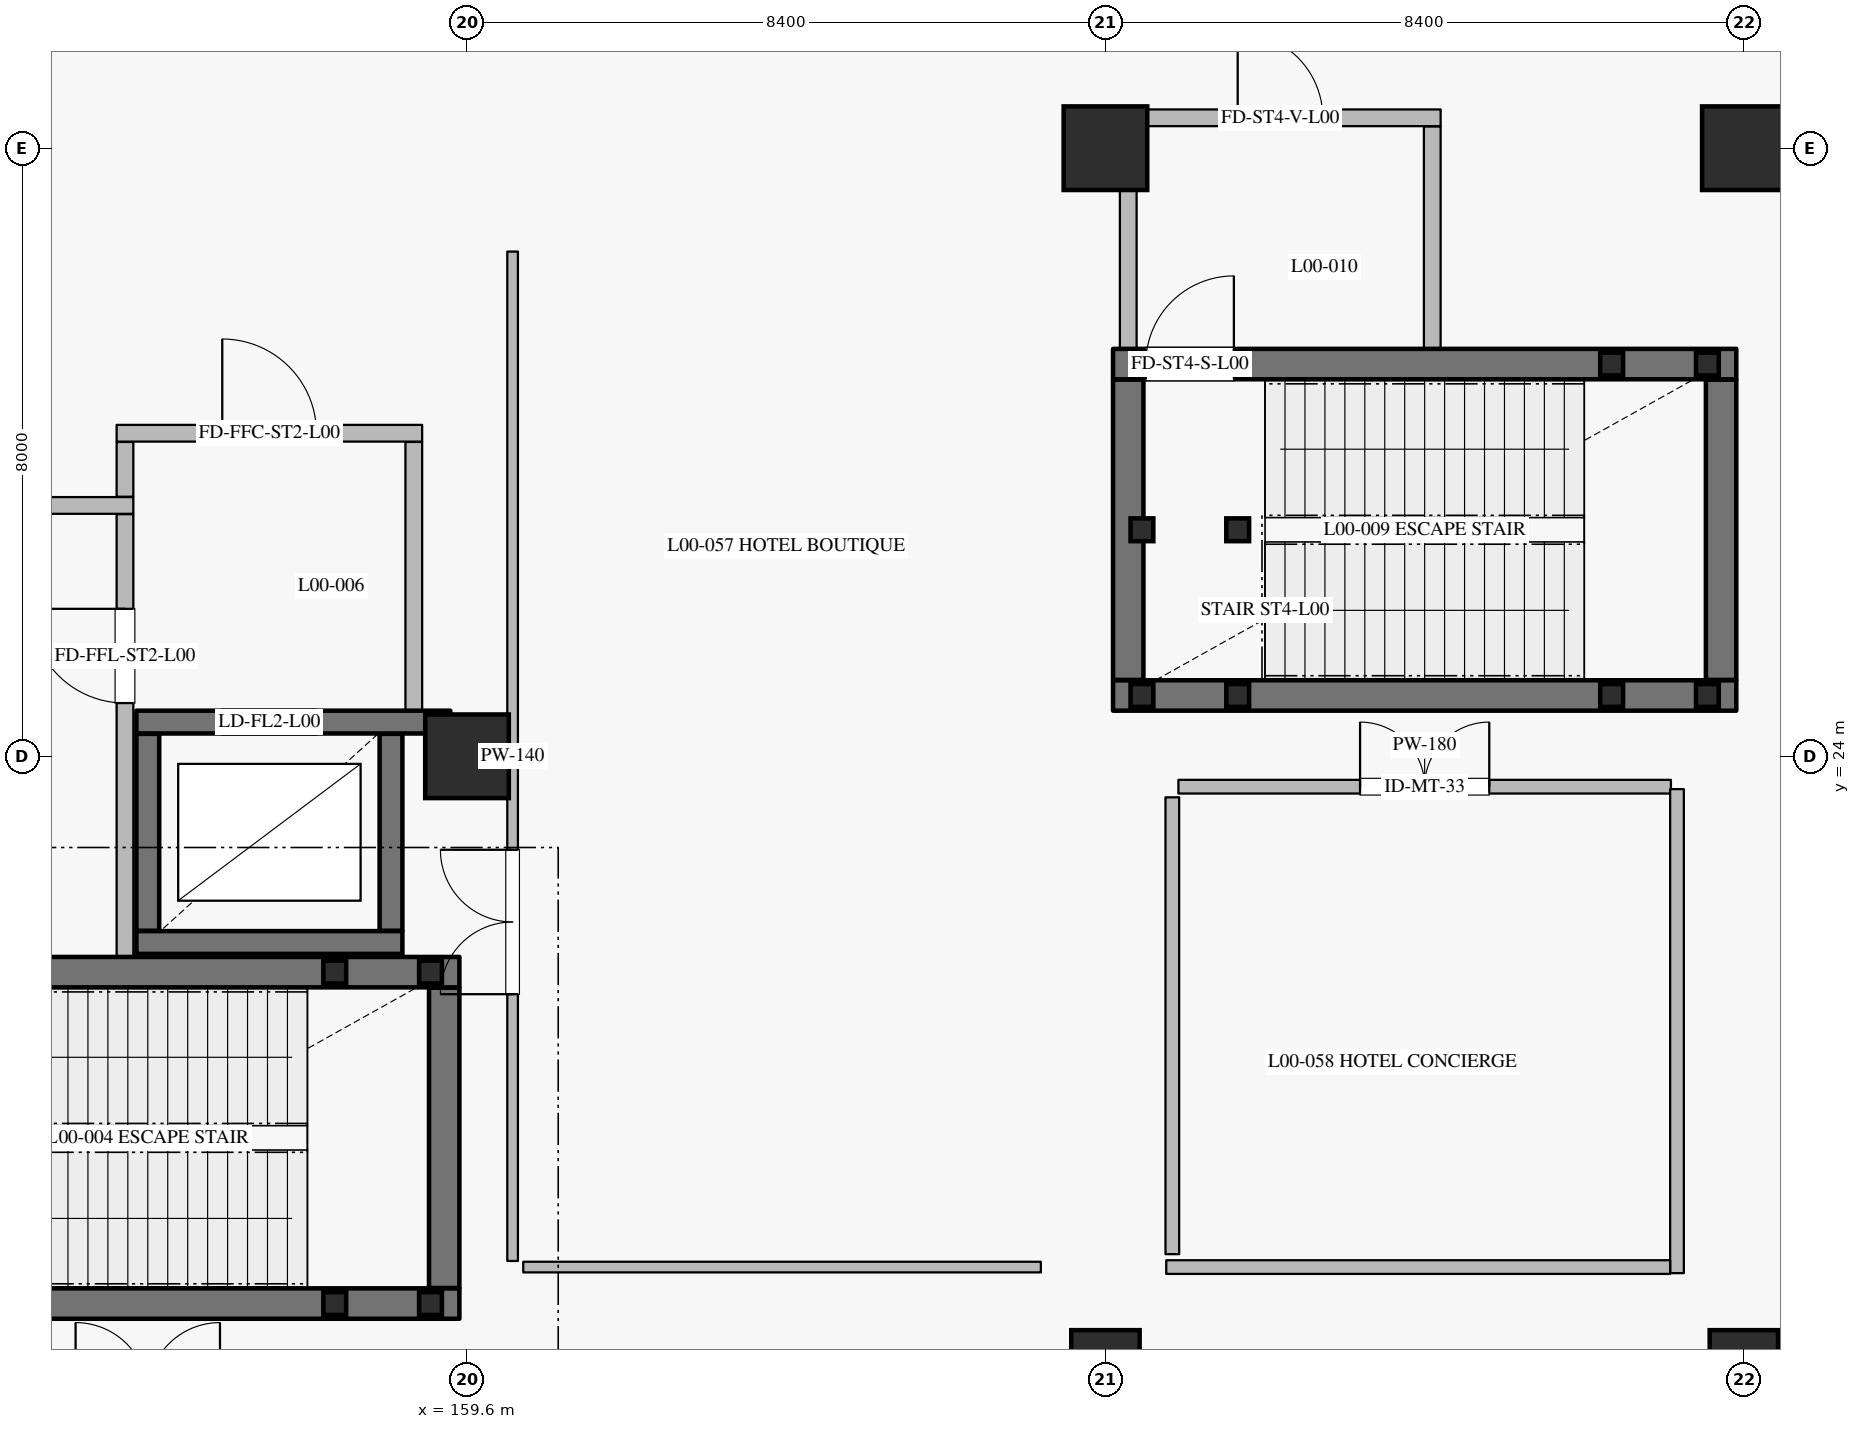
"""IFC4 building model, lengths in metres.
Left out: names, types, materials, properties, quantities, classifications, styles, units other than length and angle.
Written with IfcOpenShell. Run it as: python <this file> out.ifc"""

import sys

from ifc_helpers import new_model, si_unit, direction, frame, frame_2d, origin, origin_2d, place, context, subcontext, project, spatial, rectangle, hollow_rectangle, circle, extrude, element, fill, save


model = new_model("IFC4")
c1 = context("Model", 3, precision=1e-05, world=origin(), true_north=direction((0.0, 1.0)))
c2 = subcontext(c1, "Body", "Model", "MODEL_VIEW")
j1 = project(units=[si_unit("LENGTHUNIT", "METRE"), si_unit("PLANEANGLEUNIT", "RADIAN")], contexts=[c1])
p1 = place(None, origin())
s1 = spatial("IfcSite", under=j1, at=p1, CompositionType="ELEMENT")
p2 = place(p1, origin())
s2 = spatial("IfcBuilding", under=s1, at=p2, CompositionType="ELEMENT")
p3 = place(p2, origin())
s3 = spatial("IfcBuildingStorey", under=s2, at=p3, CompositionType="ELEMENT", Elevation=0.0)
p4 = place(p3, frame((159.6, 24.0, 0.0), z_axis=(0.0, 0.0, 1.0), x_axis=(1.0, 0.0, 0.0)))
e1 = element("IfcColumn", 1, at=p4, inside=s3, PredefinedType="COLUMN", context=c2, shape_type="SweptSolid", body=[
    extrude(circle(Radius=0.55, at=origin_2d()), origin(), (0.0, 0.0, 1.0), 6.0),
])
p5 = place(p3, frame((168.0, 16.0, 0.0), z_axis=(0.0, 0.0, 1.0), x_axis=(1.0, 0.0, 0.0)))
e2 = element("IfcColumn", 2, at=p5, inside=s3, PredefinedType="COLUMN", context=c2, shape_type="SweptSolid", body=[
    extrude(circle(Radius=0.45, at=origin_2d()), origin(), (0.0, 0.0, 1.0), 6.0),
])
p6 = place(p3, frame((168.0, 32.0, 0.0), z_axis=(0.0, 0.0, 1.0), x_axis=(1.0, 0.0, 0.0)))
e3 = element("IfcColumn", 3, at=p6, inside=s3, PredefinedType="COLUMN", context=c2, shape_type="SweptSolid", body=[
    extrude(circle(Radius=0.55, at=origin_2d()), origin(), (0.0, 0.0, 1.0), 6.0),
])
p7 = place(p3, frame((176.4, 16.0, 0.0), z_axis=(0.0, 0.0, 1.0), x_axis=(1.0, 0.0, 0.0)))
e4 = element("IfcColumn", 4, at=p7, inside=s3, PredefinedType="COLUMN", context=c2, shape_type="SweptSolid", body=[
    extrude(circle(Radius=0.45, at=origin_2d()), origin(), (0.0, 0.0, 1.0), 6.0),
])
p8 = place(p3, frame((176.4, 32.0, 0.0), z_axis=(0.0, 0.0, 1.0), x_axis=(1.0, 0.0, 0.0)))
e5 = element("IfcColumn", 5, at=p8, inside=s3, PredefinedType="COLUMN", context=c2, shape_type="SweptSolid", body=[
    extrude(circle(Radius=0.55, at=origin_2d()), origin(), (0.0, 0.0, 1.0), 6.0),
])
p9 = place(p3, frame((155.25, 21.55, 0.0), z_axis=(0.0, 0.0, 1.0), x_axis=(1.0, 0.0, 0.0)))
e6 = element("IfcWall", 6, at=p9, inside=s3, PredefinedType="SHEAR", context=c2, shape_type="SweptSolid", body=[
    extrude(rectangle(XDim=3.5, YDim=0.3, at=frame_2d((1.75, 0.0))), origin(), (0.0, 0.0, 1.0), 5.675),
])
p10 = place(p3, frame((158.6, 21.705, 0.0), z_axis=(0.0, 0.0, 1.0), x_axis=(0.0, 1.0, 0.0)))
e7 = element("IfcWall", 7, at=p10, inside=s3, PredefinedType="SHEAR", context=c2, shape_type="SweptSolid", body=[
    extrude(rectangle(XDim=2.59, YDim=0.3, at=frame_2d((1.295, 0.0))), origin(), (0.0, 0.0, 1.0), 5.675),
])
p11 = place(p3, frame((159.38, 24.45, 0.0), z_axis=(0.0, 0.0, 1.0), x_axis=(-1.0, 0.0, 0.0)))
e8 = element("IfcWall", 8, at=p11, inside=s3, PredefinedType="SHEAR", context=c2, shape_type="SweptSolid", body=[
    extrude(rectangle(XDim=4.13, YDim=0.3, at=frame_2d((2.065, 0.0))), origin(), (0.0, 0.0, 1.0), 5.675),
])
p12 = place(p11, frame((1.755, 0.0, 0.0)))
e9 = element("IfcOpeningElement", 9, at=p12, cuts=e8, PredefinedType="OPENING", context=c2, shape_type="SweptSolid", body=[
    extrude(rectangle(XDim=1.25, YDim=2.25, at=frame_2d((0.625, 1.125))), frame((0.0, 0.16, 0.0), z_axis=(0.0, -1.0, 0.0), x_axis=(1.0, 0.0, 0.0)), (0.0, 0.0, 1.0), 0.32),
])
p13 = place(p3, frame((155.4, 24.295, 0.0), z_axis=(0.0, 0.0, 1.0), x_axis=(0.0, -1.0, 0.0)))
e10 = element("IfcWall", 10, at=p13, inside=s3, PredefinedType="SHEAR", context=c2, shape_type="SweptSolid", body=[
    extrude(rectangle(XDim=2.59, YDim=0.3, at=frame_2d((1.295, 0.0))), origin(), (0.0, 0.0, 1.0), 5.675),
])
p14 = place(p3, frame((151.3, 16.8, 0.0), z_axis=(0.0, 0.0, 1.0), x_axis=(1.0, 0.0, 0.0)))
e11 = element("IfcWall", 11, at=p14, inside=s3, PredefinedType="SHEAR", context=c2, shape_type="SweptSolid", body=[
    extrude(rectangle(XDim=8.2, YDim=0.4, at=frame_2d((4.1, 0.0))), origin(), (0.0, 0.0, 1.0), 5.675),
])
p15 = place(p3, frame((159.3, 17.005, 0.0), z_axis=(0.0, 0.0, 1.0), x_axis=(0.0, 1.0, 0.0)))
e12 = element("IfcWall", 12, at=p15, inside=s3, PredefinedType="SHEAR", context=c2, shape_type="SweptSolid", body=[
    extrude(rectangle(XDim=3.95, YDim=0.4, at=frame_2d((1.975, 0.0))), origin(), (0.0, 0.0, 1.0), 5.675),
])
p16 = place(p3, frame((151.3, 21.16, 0.0), z_axis=(0.0, 0.0, 1.0), x_axis=(1.0, 0.0, 0.0)))
e13 = element("IfcWall", 13, at=p16, inside=s3, PredefinedType="SHEAR", context=c2, shape_type="SweptSolid", body=[
    extrude(rectangle(XDim=8.2, YDim=0.4, at=frame_2d((4.1, 0.0))), origin(), (0.0, 0.0, 1.0), 5.675),
])
p17 = place(p16, frame((0.43, 0.0, 0.0)))
e14 = element("IfcOpeningElement", 14, at=p17, cuts=e13, PredefinedType="OPENING", context=c2, shape_type="SweptSolid", body=[
    extrude(rectangle(XDim=1.16, YDim=2.2, at=frame_2d((0.58, 1.1))), frame((0.0, 0.21, 0.0), z_axis=(0.0, -1.0, 0.0), x_axis=(1.0, 0.0, 0.0)), (0.0, 0.0, 1.0), 0.42),
])
p18 = place(p3, frame((151.39, 27.3, 0.0), z_axis=(0.0, 0.0, 1.0), x_axis=(1.0, 0.0, 0.0)))
e15 = element("IfcWall", 15, at=p18, inside=s3, PredefinedType="PARTITIONING", context=c2, shape_type="SweptSolid", body=[
    extrude(rectangle(XDim=3.82, YDim=0.22, at=frame_2d((1.91, 0.0))), origin(), (0.0, 0.0, 1.0), 5.675),
])
p19 = place(p18, frame((1.35, 0.0, 0.0)))
e16 = element("IfcOpeningElement", 16, at=p19, cuts=e15, PredefinedType="OPENING", context=c2, shape_type="SweptSolid", body=[
    extrude(rectangle(XDim=1.12, YDim=2.2, at=frame_2d((0.56, 1.1))), frame((0.0, 0.12, 0.0), z_axis=(0.0, -1.0, 0.0), x_axis=(1.0, 0.0, 0.0)), (0.0, 0.0, 1.0), 0.24),
])
p20 = place(p3, frame((155.1, 21.365, 0.0), z_axis=(0.0, 0.0, 1.0), x_axis=(0.0, 1.0, 0.0)))
e17 = element("IfcWall", 17, at=p20, inside=s3, PredefinedType="PARTITIONING", context=c2, shape_type="SweptSolid", body=[
    extrude(rectangle(XDim=5.82, YDim=0.22, at=frame_2d((2.91, 0.0))), origin(), (0.0, 0.0, 1.0), 5.675),
])
p21 = place(p20, frame((3.335, 0.0, 0.0)))
e18 = element("IfcOpeningElement", 18, at=p21, cuts=e17, PredefinedType="OPENING", context=c2, shape_type="SweptSolid", body=[
    extrude(rectangle(XDim=1.24, YDim=2.2, at=frame_2d((0.62, 1.1))), frame((0.0, 0.12, 0.0), z_axis=(0.0, -1.0, 0.0), x_axis=(1.0, 0.0, 0.0)), (0.0, 0.0, 1.0), 0.24),
])
p22 = place(p3, frame((155.1, 27.415, 0.0), z_axis=(0.0, 0.0, 1.0), x_axis=(0.0, 1.0, 0.0)))
e19 = element("IfcWall", 19, at=p22, inside=s3, PredefinedType="PARTITIONING", context=c2, shape_type="SweptSolid", body=[
    extrude(rectangle(XDim=0.72, YDim=0.22, at=frame_2d((0.36, 0.0))), origin(), (0.0, 0.0, 1.0), 5.675),
])
p23 = place(p3, frame((158.9, 24.605, 0.0), z_axis=(0.0, 0.0, 1.0), x_axis=(0.0, 1.0, 0.0)))
e20 = element("IfcWall", 20, at=p23, inside=s3, PredefinedType="PARTITIONING", context=c2, shape_type="SweptSolid", body=[
    extrude(rectangle(XDim=3.53, YDim=0.22, at=frame_2d((1.765, 0.0))), origin(), (0.0, 0.0, 1.0), 5.675),
])
p24 = place(p3, frame((154.99, 28.25, 0.0), z_axis=(0.0, 0.0, 1.0), x_axis=(1.0, 0.0, 0.0)))
e21 = element("IfcWall", 21, at=p24, inside=s3, PredefinedType="PARTITIONING", context=c2, shape_type="SweptSolid", body=[
    extrude(rectangle(XDim=4.02, YDim=0.22, at=frame_2d((2.01, 0.0))), origin(), (0.0, 0.0, 1.0), 5.675),
])
p25 = place(p24, frame((1.39, 0.0, 0.0)))
e22 = element("IfcOpeningElement", 22, at=p25, cuts=e21, PredefinedType="OPENING", context=c2, shape_type="SweptSolid", body=[
    extrude(rectangle(XDim=1.24, YDim=2.2, at=frame_2d((0.62, 1.1))), frame((0.0, 0.12, 0.0), z_axis=(0.0, -1.0, 0.0), x_axis=(1.0, 0.0, 0.0)), (0.0, 0.0, 1.0), 0.24),
])
for number, where, z_axis, x_axis in (
    (23, (157.86, 16.8, -2.7), (0.0, 0.0, 1.0), (1.0, 0.0, 0.0)),
    (24, (157.86, 21.16, -2.7), (0.0, 0.0, 1.0), (1.0, 0.0, 0.0)),
    (25, (159.12, 16.8, -2.7), (0.0, 0.0, 1.0), (1.0, 0.0, 0.0)),
    (26, (159.12, 21.16, -2.7), (0.0, 0.0, 1.0), (1.0, 0.0, 0.0)),
):
    element("IfcColumn", number, at=place(p3, frame(where, z_axis=z_axis, x_axis=x_axis)), inside=s3, PredefinedType="COLUMN", context=c2, shape_type="SweptSolid", body=[
        extrude(hollow_rectangle(XDim=0.3, YDim=0.3, WallThickness=0.012, at=origin_2d()), origin(), (0.0, 0.0, 1.0), 5.52),
    ])
p26 = place(p3, frame((168.1, 24.8, 0.0), z_axis=(0.0, 0.0, 1.0), x_axis=(1.0, 0.0, 0.0)))
e27 = element("IfcWall", 27, at=p26, inside=s3, PredefinedType="SHEAR", context=c2, shape_type="SweptSolid", body=[
    extrude(rectangle(XDim=8.2, YDim=0.4, at=frame_2d((4.1, 0.0))), origin(), (0.0, 0.0, 1.0), 5.675),
])
p27 = place(p3, frame((176.1, 25.005, 0.0), z_axis=(0.0, 0.0, 1.0), x_axis=(0.0, 1.0, 0.0)))
e28 = element("IfcWall", 28, at=p27, inside=s3, PredefinedType="SHEAR", context=c2, shape_type="SweptSolid", body=[
    extrude(rectangle(XDim=3.95, YDim=0.4, at=frame_2d((1.975, 0.0))), origin(), (0.0, 0.0, 1.0), 5.675),
])
p28 = place(p3, frame((168.1, 29.16, 0.0), z_axis=(0.0, 0.0, 1.0), x_axis=(1.0, 0.0, 0.0)))
e29 = element("IfcWall", 29, at=p28, inside=s3, PredefinedType="SHEAR", context=c2, shape_type="SweptSolid", body=[
    extrude(rectangle(XDim=8.2, YDim=0.4, at=frame_2d((4.1, 0.0))), origin(), (0.0, 0.0, 1.0), 5.675),
])
p29 = place(p28, frame((0.43, 0.0, 0.0)))
e30 = element("IfcOpeningElement", 30, at=p29, cuts=e29, PredefinedType="OPENING", context=c2, shape_type="SweptSolid", body=[
    extrude(rectangle(XDim=1.16, YDim=2.2, at=frame_2d((0.58, 1.1))), frame((0.0, 0.21, 0.0), z_axis=(0.0, -1.0, 0.0), x_axis=(1.0, 0.0, 0.0)), (0.0, 0.0, 1.0), 0.42),
])
p30 = place(p3, frame((168.3, 25.005, 0.0), z_axis=(0.0, 0.0, 1.0), x_axis=(0.0, 1.0, 0.0)))
e31 = element("IfcWall", 31, at=p30, inside=s3, PredefinedType="SHEAR", context=c2, shape_type="SweptSolid", body=[
    extrude(rectangle(XDim=3.95, YDim=0.4, at=frame_2d((1.975, 0.0))), origin(), (0.0, 0.0, 1.0), 5.675),
])
p31 = place(p3, frame((168.3, 29.365, 0.0), z_axis=(0.0, 0.0, 1.0), x_axis=(0.0, 1.0, 0.0)))
e32 = element("IfcWall", 32, at=p31, inside=s3, PredefinedType="PARTITIONING", context=c2, shape_type="SweptSolid", body=[
    extrude(rectangle(XDim=2.92, YDim=0.22, at=frame_2d((1.46, 0.0))), origin(), (0.0, 0.0, 1.0), 4.75),
])
p32 = place(p3, frame((168.19, 32.4, 0.0), z_axis=(0.0, 0.0, 1.0), x_axis=(1.0, 0.0, 0.0)))
e33 = element("IfcWall", 33, at=p32, inside=s3, PredefinedType="PARTITIONING", context=c2, shape_type="SweptSolid", body=[
    extrude(rectangle(XDim=4.22, YDim=0.22, at=frame_2d((2.11, 0.0))), origin(), (0.0, 0.0, 1.0), 5.675),
])
p33 = place(p32, frame((1.55, 0.0, 0.0)))
e34 = element("IfcOpeningElement", 34, at=p33, cuts=e33, PredefinedType="OPENING", context=c2, shape_type="SweptSolid", body=[
    extrude(rectangle(XDim=1.12, YDim=2.2, at=frame_2d((0.56, 1.1))), frame((0.0, 0.12, 0.0), z_axis=(0.0, -1.0, 0.0), x_axis=(1.0, 0.0, 0.0)), (0.0, 0.0, 1.0), 0.24),
])
p34 = place(p3, frame((172.3, 29.365, 0.0), z_axis=(0.0, 0.0, 1.0), x_axis=(0.0, 1.0, 0.0)))
e35 = element("IfcWall", 35, at=p34, inside=s3, PredefinedType="PARTITIONING", context=c2, shape_type="SweptSolid", body=[
    extrude(rectangle(XDim=2.92, YDim=0.22, at=frame_2d((1.46, 0.0))), origin(), (0.0, 0.0, 1.0), 5.675),
])
for number, where, z_axis, x_axis in (
    (36, (168.48, 24.8, 0.0), (0.0, 0.0, 1.0), (1.0, 0.0, 0.0)),
    (37, (168.48, 26.98, 0.0), (0.0, 0.0, 1.0), (1.0, 0.0, 0.0)),
    (38, (169.74, 24.8, 0.0), (0.0, 0.0, 1.0), (1.0, 0.0, 0.0)),
    (39, (169.74, 26.98, 0.0), (0.0, 0.0, 1.0), (1.0, 0.0, 0.0)),
):
    element("IfcColumn", number, at=place(p3, frame(where, z_axis=z_axis, x_axis=x_axis)), inside=s3, PredefinedType="COLUMN", context=c2, shape_type="SweptSolid", body=[
        extrude(hollow_rectangle(XDim=0.3, YDim=0.3, WallThickness=0.012, at=origin_2d()), origin(), (0.0, 0.0, 1.0), 5.82),
    ])
for number, where, z_axis, x_axis in (
    (40, (174.66, 24.8, -2.7), (0.0, 0.0, 1.0), (1.0, 0.0, 0.0)),
    (41, (174.66, 29.16, -2.7), (0.0, 0.0, 1.0), (1.0, 0.0, 0.0)),
    (42, (175.92, 24.8, -2.7), (0.0, 0.0, 1.0), (1.0, 0.0, 0.0)),
    (43, (175.92, 29.16, -2.7), (0.0, 0.0, 1.0), (1.0, 0.0, 0.0)),
):
    element("IfcColumn", number, at=place(p3, frame(where, z_axis=z_axis, x_axis=x_axis)), inside=s3, PredefinedType="COLUMN", context=c2, shape_type="SweptSolid", body=[
        extrude(hollow_rectangle(XDim=0.3, YDim=0.3, WallThickness=0.012, at=origin_2d()), origin(), (0.0, 0.0, 1.0), 5.52),
    ])
p35 = place(p3, frame((160.2, 17.36, 0.0), z_axis=(0.0, 0.0, 1.0), x_axis=(0.0, 1.0, 0.0)))
e44 = element("IfcWall", 44, at=p35, inside=s3, PredefinedType="PARTITIONING", context=c2, shape_type="SweptSolid", body=[
    extrude(rectangle(XDim=13.28, YDim=0.14, at=frame_2d((6.64, 0.0))), origin(), (0.0, 0.0, 1.0), 5.675),
])
p36 = place(p35, frame((3.51, 0.0, 0.0)))
e45 = element("IfcOpeningElement", 45, at=p36, cuts=e44, PredefinedType="OPENING", context=c2, shape_type="SweptSolid", body=[
    extrude(rectangle(XDim=1.9, YDim=2.4, at=frame_2d((0.95, 1.2))), frame((0.0, 0.08, 0.0), z_axis=(0.0, -1.0, 0.0), x_axis=(1.0, 0.0, 0.0)), (0.0, 0.0, 1.0), 0.16),
])
p37 = place(p3, frame((160.34, 17.28, 0.0), z_axis=(0.0, 0.0, 1.0), x_axis=(1.0, 0.0, 0.0)))
e46 = element("IfcWall", 46, at=p37, inside=s3, PredefinedType="PARTITIONING", context=c2, shape_type="SweptSolid", body=[
    extrude(rectangle(XDim=6.81, YDim=0.14, at=frame_2d((3.405, 0.0))), origin(), (0.0, 0.0, 1.0), 5.675),
])
p38 = place(p3, frame((168.96, 23.6, 0.0), z_axis=(0.0, 0.0, 1.0), x_axis=(1.0, 0.0, 0.0)))
e47 = element("IfcWall", 47, at=p38, inside=s3, PredefinedType="PARTITIONING", context=c2, shape_type="SweptSolid", body=[
    extrude(rectangle(XDim=6.48, YDim=0.18, at=frame_2d((3.24, 0.0))), origin(), (0.0, 0.0, 1.0), 5.675),
])
p39 = place(p38, frame((2.39, 0.0, 0.0)))
e48 = element("IfcOpeningElement", 48, at=p39, cuts=e47, PredefinedType="OPENING", context=c2, shape_type="SweptSolid", body=[
    extrude(rectangle(XDim=1.7, YDim=2.3, at=frame_2d((0.85, 1.15))), frame((0.0, 0.1, 0.0), z_axis=(0.0, -1.0, 0.0), x_axis=(1.0, 0.0, 0.0)), (0.0, 0.0, 1.0), 0.2),
])
p40 = place(p3, frame((168.88, 17.45, 0.0), z_axis=(0.0, 0.0, 1.0), x_axis=(0.0, 1.0, 0.0)))
e49 = element("IfcWall", 49, at=p40, inside=s3, PredefinedType="PARTITIONING", context=c2, shape_type="SweptSolid", body=[
    extrude(rectangle(XDim=6.01, YDim=0.18, at=frame_2d((3.005, 0.0))), origin(), (0.0, 0.0, 1.0), 5.675),
])
p41 = place(p3, frame((175.52, 17.2, 0.0), z_axis=(0.0, 0.0, 1.0), x_axis=(0.0, 1.0, 0.0)))
e50 = element("IfcWall", 50, at=p41, inside=s3, PredefinedType="PARTITIONING", context=c2, shape_type="SweptSolid", body=[
    extrude(rectangle(XDim=6.368, YDim=0.18, at=frame_2d((3.184, 0.0))), origin(), (0.0, 0.0, 1.0), 5.675),
])
p42 = place(p3, frame((168.8, 17.28, 0.0), z_axis=(0.0, 0.0, 1.0), x_axis=(1.0, 0.0, 0.0)))
e51 = element("IfcWall", 51, at=p42, inside=s3, PredefinedType="PARTITIONING", context=c2, shape_type="SweptSolid", body=[
    extrude(rectangle(XDim=6.63, YDim=0.18, at=frame_2d((3.315, 0.0))), origin(), (0.0, 0.0, 1.0), 5.675),
])
p43 = place(p12, origin())
e52 = element("IfcDoor", 52, at=p43, inside=s3, OperationType="DOUBLE_DOOR_SLIDING", PredefinedType="DOOR", context=c2, shape_type="SweptSolid", body=[
    extrude(rectangle(XDim=1.25, YDim=2.25, at=frame_2d((0.625, 1.125))), frame((0.0, 0.025, 0.0), z_axis=(0.0, -1.0, 0.0), x_axis=(1.0, 0.0, 0.0)), (0.0, 0.0, 1.0), 0.05),
])
fill(e9, e52)
p44 = place(p21, origin())
e53 = element("IfcDoor", 53, at=p44, inside=s3, OperationType="SINGLE_SWING_RIGHT", PredefinedType="DOOR", context=c2, shape_type="SweptSolid", body=[
    extrude(rectangle(XDim=1.24, YDim=2.2, at=frame_2d((0.62, 1.1))), frame((0.0, 0.025, 0.0), z_axis=(0.0, -1.0, 0.0), x_axis=(1.0, 0.0, 0.0)), (0.0, 0.0, 1.0), 0.05),
])
fill(e18, e53)
p45 = place(p25, origin())
e54 = element("IfcDoor", 54, at=p45, inside=s3, OperationType="SINGLE_SWING_LEFT", PredefinedType="DOOR", context=c2, shape_type="SweptSolid", body=[
    extrude(rectangle(XDim=1.24, YDim=2.2, at=frame_2d((0.62, 1.1))), frame((0.0, 0.025, 0.0), z_axis=(0.0, -1.0, 0.0), x_axis=(1.0, 0.0, 0.0)), (0.0, 0.0, 1.0), 0.05),
])
fill(e22, e54)
p46 = place(p29, origin())
e55 = element("IfcDoor", 55, at=p46, inside=s3, OperationType="SINGLE_SWING_RIGHT", PredefinedType="DOOR", context=c2, shape_type="SweptSolid", body=[
    extrude(rectangle(XDim=1.16, YDim=2.2, at=frame_2d((0.58, 1.1))), frame((0.0, 0.025, 0.0), z_axis=(0.0, -1.0, 0.0), x_axis=(1.0, 0.0, 0.0)), (0.0, 0.0, 1.0), 0.05),
])
fill(e30, e55)
p47 = place(p33, origin())
e56 = element("IfcDoor", 56, at=p47, inside=s3, OperationType="SINGLE_SWING_LEFT", PredefinedType="DOOR", context=c2, shape_type="SweptSolid", body=[
    extrude(rectangle(XDim=1.12, YDim=2.2, at=frame_2d((0.56, 1.1))), frame((0.0, 0.025, 0.0), z_axis=(0.0, -1.0, 0.0), x_axis=(1.0, 0.0, 0.0)), (0.0, 0.0, 1.0), 0.05),
])
fill(e34, e56)
p48 = place(p36, origin())
e57 = element("IfcDoor", 57, at=p48, inside=s3, OperationType="DOUBLE_DOOR_SINGLE_SWING", PredefinedType="DOOR", context=c2, shape_type="SweptSolid", body=[
    extrude(rectangle(XDim=1.9, YDim=2.4, at=frame_2d((0.95, 1.2))), frame((0.0, 0.025, 0.0), z_axis=(0.0, -1.0, 0.0), x_axis=(1.0, 0.0, 0.0)), (0.0, 0.0, 1.0), 0.05),
])
fill(e45, e57)
p49 = place(p39, origin())
e58 = element("IfcDoor", 58, at=p49, inside=s3, OperationType="DOUBLE_DOOR_SINGLE_SWING", PredefinedType="DOOR", context=c2, shape_type="SweptSolid", body=[
    extrude(rectangle(XDim=1.7, YDim=2.3, at=frame_2d((0.85, 1.15))), frame((0.0, 0.025, 0.0), z_axis=(0.0, -1.0, 0.0), x_axis=(1.0, 0.0, 0.0)), (0.0, 0.0, 1.0), 0.05),
])
fill(e48, e58)
save(model, sys.argv[1])
